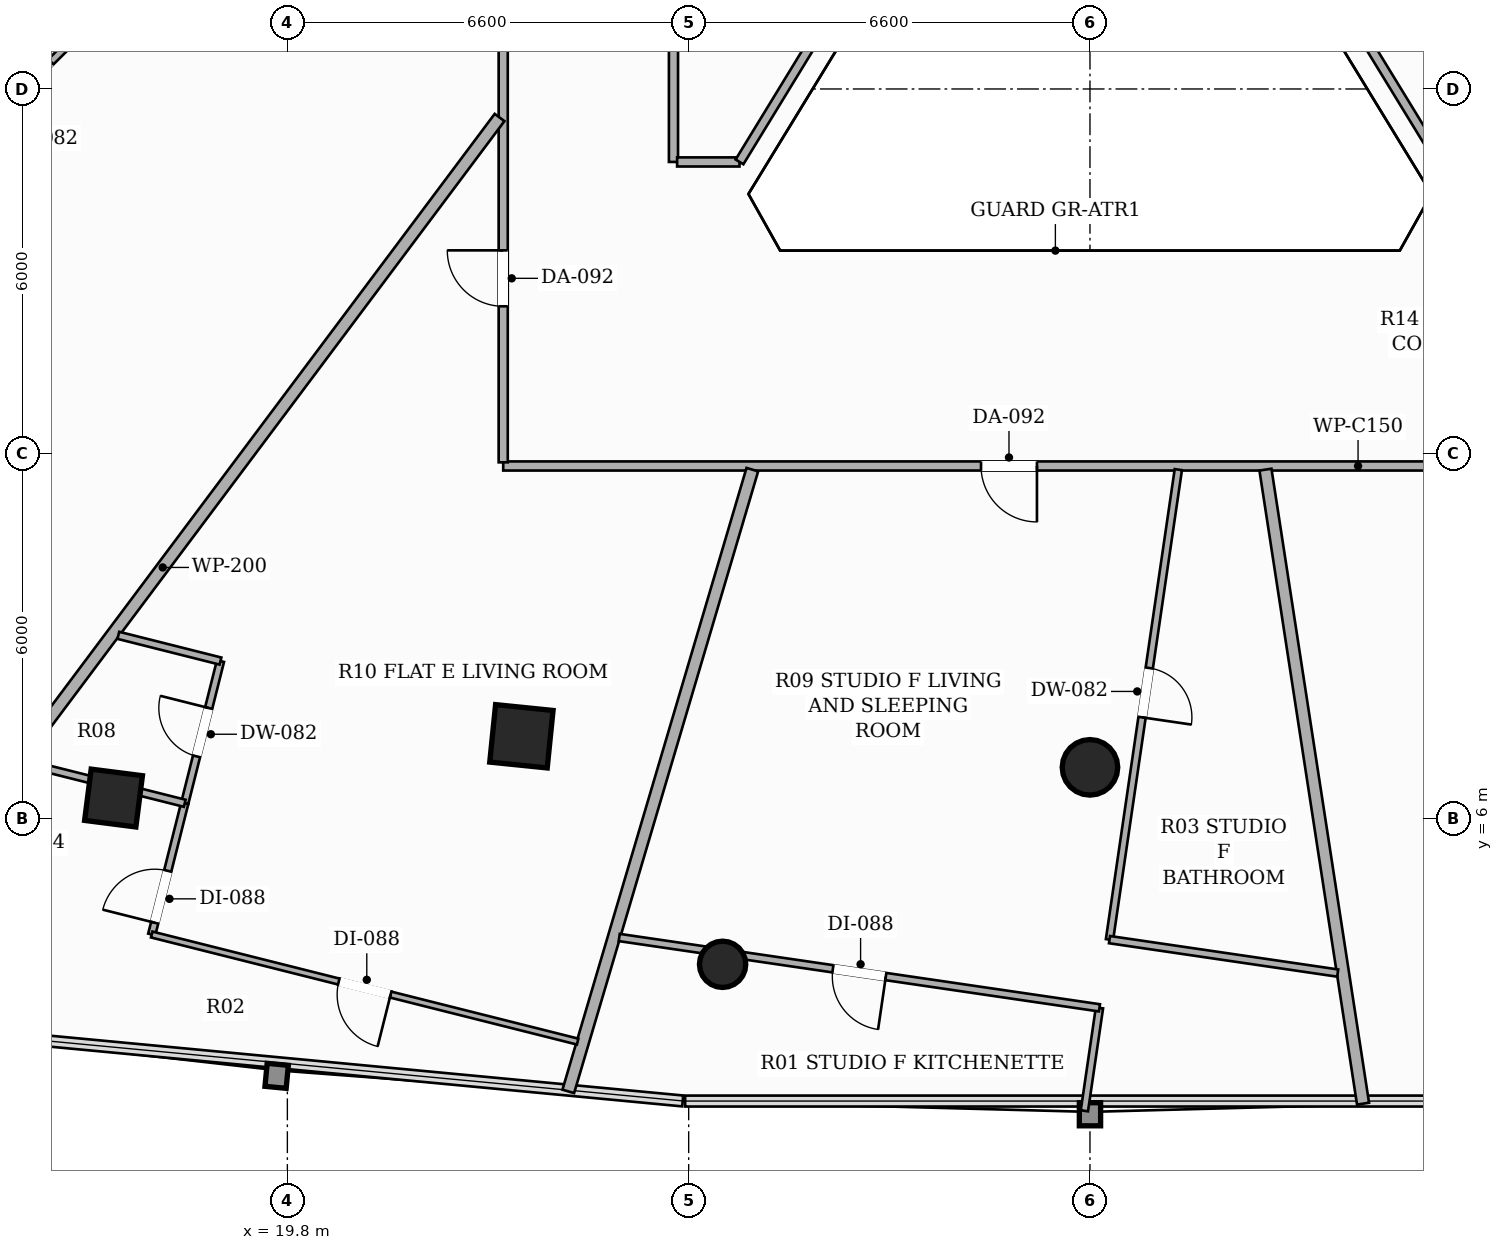
"""IFC4 building model, lengths in metres.
Left out: names, types, materials, properties, quantities, classifications, styles, units other than length and angle.
Written with IfcOpenShell. Run it as: python <this file> out.ifc"""

import sys

from ifc_helpers import new_model, si_unit, direction, frame, frame_2d, origin, origin_2d, place, context, subcontext, project, spatial, rectangle, hollow_rectangle, hollow_circle, extrude, element, fill, save


model = new_model("IFC4")
c1 = context("Model", 3, precision=1e-05, world=origin(), true_north=direction((0.0, 1.0)))
c2 = subcontext(c1, "Body", "Model", "MODEL_VIEW")
j1 = project(units=[si_unit("LENGTHUNIT", "METRE"), si_unit("PLANEANGLEUNIT", "RADIAN")], contexts=[c1])
p1 = place(None, origin())
s1 = spatial("IfcSite", under=j1, at=p1, CompositionType="ELEMENT")
p2 = place(p1, origin())
s2 = spatial("IfcBuilding", under=s1, at=p2, CompositionType="ELEMENT")
p3 = place(p2, frame((0.0, 0.0, 36.8)))
s3 = spatial("IfcBuildingStorey", under=s2, at=p3, CompositionType="ELEMENT", Elevation=36.8)
p4 = place(p3, frame((23.649, 7.355, 0.0), z_axis=(0.0, 0.0, 1.0), x_axis=(-0.994880708829, 0.101056297183, 0.0)))
e1 = element("IfcColumn", 1, at=p4, inside=s3, PredefinedType="COLUMN", context=c2, shape_type="SweptSolid", body=[
    extrude(hollow_rectangle(XDim=0.95, YDim=0.95, WallThickness=0.032, at=origin_2d()), origin(), (0.0, 0.0, 1.0), 3.3),
])
p5 = place(p3, frame((33.0, 6.844, 0.0), z_axis=(0.0, 0.0, 1.0), x_axis=(1.0, 0.0, 0.0)))
e2 = element("IfcColumn", 2, at=p5, inside=s3, PredefinedType="COLUMN", context=c2, shape_type="SweptSolid", body=[
    extrude(hollow_circle(Radius=0.457, WallThickness=0.025, at=origin_2d()), origin(), (0.0, 0.0, 1.0), 3.3),
])
p6 = place(p3, frame((16.941, 6.339, 0.0), z_axis=(0.0, 0.0, 1.0), x_axis=(-0.99189444259, 0.127064608601, 0.0)))
e3 = element("IfcColumn", 3, at=p6, inside=s3, PredefinedType="COLUMN", context=c2, shape_type="SweptSolid", body=[
    extrude(hollow_rectangle(XDim=0.85, YDim=0.85, WallThickness=0.028, at=origin_2d()), origin(), (0.0, 0.0, 1.0), 3.3),
])
p7 = place(p3, frame((26.958, 3.605, 0.0), z_axis=(0.0, 0.0, 1.0), x_axis=(1.0, 0.0, 0.0)))
e4 = element("IfcColumn", 4, at=p7, inside=s3, PredefinedType="COLUMN", context=c2, shape_type="SweptSolid", body=[
    extrude(hollow_circle(Radius=0.381, WallThickness=0.022, at=origin_2d()), origin(), (0.0, 0.0, 1.0), 3.3),
])
p8 = place(p3, frame((42.59, 11.8, 0.0), z_axis=(0.0, 0.0, 1.0), x_axis=(-1.0, 0.0, 0.0)))
e5 = element("IfcWall", 5, at=p8, inside=s3, PredefinedType="PARTITIONING", context=c2, shape_type="SweptSolid", body=[
    extrude(rectangle(XDim=19.24, YDim=0.15, at=frame_2d((9.62, 0.0))), origin(), (0.0, 0.0, 1.0), 2.669),
])
p9 = place(p8, frame((10.462, 0.0, 0.0)))
e6 = element("IfcOpeningElement", 6, at=p9, cuts=e5, PredefinedType="OPENING", context=c2, shape_type="SweptSolid", body=[
    extrude(rectangle(XDim=0.92, YDim=2.15, at=frame_2d((0.46, 1.075))), frame((0.0, 0.085, 0.0), z_axis=(0.0, -1.0, 0.0), x_axis=(1.0, 0.0, 0.0)), (0.0, 0.0, 1.0), 0.17),
])
p10 = place(p3, frame((23.35, 11.86, 0.0), z_axis=(0.0, 0.0, 1.0), x_axis=(0.0, 1.0, 0.0)))
e7 = element("IfcWall", 7, at=p10, inside=s3, PredefinedType="PARTITIONING", context=c2, shape_type="SweptSolid", body=[
    extrude(rectangle(XDim=25.04, YDim=0.15, at=frame_2d((12.52, 0.0))), origin(), (0.0, 0.0, 1.0), 2.413),
])
p11 = place(p10, frame((9.29, 0.0, 0.0)))
e8 = element("IfcOpeningElement", 8, at=p11, cuts=e7, PredefinedType="OPENING", context=c2, shape_type="SweptSolid", body=[
    extrude(rectangle(XDim=0.92, YDim=2.15, at=frame_2d((0.46, 1.075))), frame((0.0, 0.085, 0.0), z_axis=(0.0, -1.0, 0.0), x_axis=(1.0, 0.0, 0.0)), (0.0, 0.0, 1.0), 0.17),
])
p12 = place(p10, frame((18.865, 0.0, 0.0)))
e9 = element("IfcOpeningElement", 9, at=p12, cuts=e7, PredefinedType="OPENING", context=c2, shape_type="SweptSolid", body=[
    extrude(rectangle(XDim=0.88, YDim=2.1, at=frame_2d((0.44, 1.05))), frame((0.0, 0.085, 0.0), z_axis=(0.0, -1.0, 0.0), x_axis=(1.0, 0.0, 0.0)), (0.0, 0.0, 1.0), 0.17),
])
p13 = place(p10, frame((2.566, 0.0, 0.0)))
e10 = element("IfcOpeningElement", 10, at=p13, cuts=e7, PredefinedType="OPENING", context=c2, shape_type="SweptSolid", body=[
    extrude(rectangle(XDim=0.92, YDim=2.15, at=frame_2d((0.46, 1.075))), frame((0.0, 0.085, 0.0), z_axis=(0.0, -1.0, 0.0), x_axis=(1.0, 0.0, 0.0)), (0.0, 0.0, 1.0), 0.17),
])
p14 = place(p3, frame((26.15, 23.79, 0.0), z_axis=(0.0, 0.0, 1.0), x_axis=(0.0, -1.0, 0.0)))
e11 = element("IfcWall", 11, at=p14, inside=s3, PredefinedType="PARTITIONING", context=c2, shape_type="SweptSolid", body=[
    extrude(rectangle(XDim=6.99, YDim=0.15, at=frame_2d((3.495, 0.0))), origin(), (0.0, 0.0, 1.0), 2.669),
])
p15 = place(p14, frame((3.055, 0.0, 0.0)))
e12 = element("IfcOpeningElement", 12, at=p15, cuts=e11, PredefinedType="OPENING", context=c2, shape_type="SweptSolid", body=[
    extrude(rectangle(XDim=0.88, YDim=2.1, at=frame_2d((0.44, 1.05))), frame((0.0, 0.085, 0.0), z_axis=(0.0, -1.0, 0.0), x_axis=(1.0, 0.0, 0.0)), (0.0, 0.0, 1.0), 0.17),
])
p16 = place(p3, frame((26.21, 16.8, 0.0), z_axis=(0.0, 0.0, 1.0), x_axis=(1.0, 0.0, 0.0)))
e13 = element("IfcWall", 13, at=p16, inside=s3, PredefinedType="PARTITIONING", context=c2, shape_type="SweptSolid", body=[
    extrude(rectangle(XDim=1.026, YDim=0.15, at=frame_2d((0.513, 0.0))), origin(), (0.0, 0.0, 1.0), 3.06),
])
p17 = place(p3, frame((27.236, 16.801, 0.0), z_axis=(0.0, 0.0, 1.0), x_axis=(0.521617567684, 0.853179414358, 0.0)))
e14 = element("IfcWall", 14, at=p17, inside=s3, PredefinedType="PARTITIONING", context=c2, shape_type="SweptSolid", body=[
    extrude(rectangle(XDim=8.192, YDim=0.15, at=frame_2d((4.096, 0.0))), origin(), (0.0, 0.0, 1.0), 2.669),
])
p18 = place(p3, frame((34.486, 23.79, 0.0), z_axis=(0.0, 0.0, 1.0), x_axis=(0.521998190399, -0.852946592244, 0.0)))
e15 = element("IfcWall", 15, at=p18, inside=s3, PredefinedType="PARTITIONING", context=c2, shape_type="SweptSolid", body=[
    extrude(rectangle(XDim=8.195, YDim=0.15, at=frame_2d((4.098, 0.0))), origin(), (0.0, 0.0, 1.0), 2.669),
])
p19 = place(p3, frame((23.29, 17.531, 0.0), z_axis=(0.0, 0.0, 1.0), x_axis=(-0.599334217596, -0.800498904196, 0.0)))
e16 = element("IfcWall", 16, at=p19, inside=s3, PredefinedType="PARTITIONING", context=c2, shape_type="SweptSolid", body=[
    extrude(rectangle(XDim=18.487, YDim=0.2, at=frame_2d((9.244, 0.0))), origin(), (0.0, 0.0, 1.0), 2.413),
])
p20 = place(p3, frame((37.491, 1.313, 0.0), z_axis=(0.0, 0.0, 1.0), x_axis=(-0.152133698634, 0.988359923176, 0.0)))
e17 = element("IfcWall", 17, at=p20, inside=s3, PredefinedType="PARTITIONING", context=c2, shape_type="SweptSolid", body=[
    extrude(rectangle(XDim=10.55, YDim=0.2, at=frame_2d((5.275, 0.0))), origin(), (0.0, 0.0, 1.0), 2.413),
])
p21 = place(p3, frame((27.447, 11.74, 0.0), z_axis=(0.0, 0.0, 1.0), x_axis=(-0.283867721737, -0.958863450422, 0.0)))
e18 = element("IfcWall", 18, at=p21, inside=s3, PredefinedType="PARTITIONING", context=c2, shape_type="SweptSolid", body=[
    extrude(rectangle(XDim=10.664, YDim=0.2, at=frame_2d((5.332, 0.0))), origin(), (0.0, 0.0, 1.0), 2.413),
])
p22 = place(p3, frame((14.497, 17.043, 0.0), z_axis=(0.0, 0.0, 1.0), x_axis=(0.709608291954, 0.704596389425, 0.0)))
e19 = element("IfcWall", 19, at=p22, inside=s3, PredefinedType="PARTITIONING", context=c2, shape_type="SweptSolid", body=[
    extrude(rectangle(XDim=3.166, YDim=0.12, at=frame_2d((1.583, 0.0))), origin(), (0.0, 0.0, 1.0), 2.413),
])
p23 = place(p22, frame((1.173, 0.0, 0.0)))
e20 = element("IfcOpeningElement", 20, at=p23, cuts=e19, PredefinedType="OPENING", context=c2, shape_type="SweptSolid", body=[
    extrude(rectangle(XDim=0.82, YDim=2.1, at=frame_2d((0.41, 1.05))), frame((0.0, 0.07, 0.0), z_axis=(0.0, -1.0, 0.0), x_axis=(1.0, 0.0, 0.0)), (0.0, 0.0, 1.0), 0.14),
])
p24 = place(p3, frame((18.112, 6.253, 0.0), z_axis=(0.0, 0.0, 1.0), x_axis=(0.2437501366, 0.96983806427, 0.0)))
e21 = element("IfcWall", 21, at=p24, inside=s3, PredefinedType="PARTITIONING", context=c2, shape_type="SweptSolid", body=[
    extrude(rectangle(XDim=2.412, YDim=0.12, at=frame_2d((1.206, 0.0))), origin(), (0.0, 0.0, 1.0), 2.413),
])
p25 = place(p24, frame((0.796, 0.0, 0.0)))
e22 = element("IfcOpeningElement", 22, at=p25, cuts=e21, PredefinedType="OPENING", context=c2, shape_type="SweptSolid", body=[
    extrude(rectangle(XDim=0.82, YDim=2.1, at=frame_2d((0.41, 1.05))), frame((0.0, 0.07, 0.0), z_axis=(0.0, -1.0, 0.0), x_axis=(1.0, 0.0, 0.0)), (0.0, 0.0, 1.0), 0.14),
])
p26 = place(p3, frame((18.7, 8.592, 0.0), z_axis=(0.0, 0.0, 1.0), x_axis=(-0.969751613308, 0.244093851802, 0.0)))
e23 = element("IfcWall", 23, at=p26, inside=s3, PredefinedType="PARTITIONING", context=c2, shape_type="SweptSolid", body=[
    extrude(rectangle(XDim=1.732, YDim=0.12, at=frame_2d((0.866, 0.0))), origin(), (0.0, 0.0, 1.0), 2.669),
])
p27 = place(p3, frame((17.569, 4.095, 0.0), z_axis=(0.0, 0.0, 1.0), x_axis=(0.244006821807, 0.969773515266, 0.0)))
e24 = element("IfcWall", 24, at=p27, inside=s3, PredefinedType="PARTITIONING", context=c2, shape_type="SweptSolid", body=[
    extrude(rectangle(XDim=2.225, YDim=0.12, at=frame_2d((1.113, 0.0))), origin(), (0.0, 0.0, 1.0), 2.413),
])
p28 = place(p27, frame((0.2, 0.0, 0.0)))
e25 = element("IfcOpeningElement", 25, at=p28, cuts=e24, PredefinedType="OPENING", context=c2, shape_type="SweptSolid", body=[
    extrude(rectangle(XDim=0.88, YDim=2.1, at=frame_2d((0.44, 1.05))), frame((0.0, 0.07, 0.0), z_axis=(0.0, -1.0, 0.0), x_axis=(1.0, 0.0, 0.0)), (0.0, 0.0, 1.0), 0.14),
])
p29 = place(p3, frame((24.574, 2.334, 0.0), z_axis=(0.0, 0.0, 1.0), x_axis=(-0.9698235368, 0.243807931512, 0.0)))
e26 = element("IfcWall", 26, at=p29, inside=s3, PredefinedType="PARTITIONING", context=c2, shape_type="SweptSolid", body=[
    extrude(rectangle(XDim=7.223, YDim=0.1, at=frame_2d((3.611, 0.0))), origin(), (0.0, 0.0, 1.0), 3.06),
])
p30 = place(p29, frame((3.171, 0.0, 0.0)))
e27 = element("IfcOpeningElement", 27, at=p30, cuts=e26, PredefinedType="OPENING", context=c2, shape_type="SweptSolid", body=[
    extrude(rectangle(XDim=0.88, YDim=2.1, at=frame_2d((0.44, 1.05))), frame((0.0, 0.06, 0.0), z_axis=(0.0, -1.0, 0.0), x_axis=(1.0, 0.0, 0.0)), (0.0, 0.0, 1.0), 0.12),
])
p31 = place(p3, frame((18.112, 6.253, 0.0), z_axis=(0.0, 0.0, 1.0), x_axis=(-0.969869517874, 0.243624954178, 0.0)))
e28 = element("IfcWall", 28, at=p31, inside=s3, PredefinedType="PARTITIONING", context=c2, shape_type="SweptSolid", body=[
    extrude(rectangle(XDim=2.742, YDim=0.12, at=frame_2d((1.371, 0.0))), origin(), (0.0, 0.0, 1.0), 2.413),
])
p32 = place(p3, frame((34.453, 11.74, 0.0), z_axis=(0.0, 0.0, 1.0), x_axis=(-0.14489470787, -0.989447079753, 0.0)))
e29 = element("IfcWall", 29, at=p32, inside=s3, PredefinedType="PARTITIONING", context=c2, shape_type="SweptSolid", body=[
    extrude(rectangle(XDim=7.812, YDim=0.12, at=frame_2d((3.906, 0.0))), origin(), (0.0, 0.0, 1.0), 2.413),
])
p33 = place(p32, frame((3.297, 0.0, 0.0)))
e30 = element("IfcOpeningElement", 30, at=p33, cuts=e29, PredefinedType="OPENING", context=c2, shape_type="SweptSolid", body=[
    extrude(rectangle(XDim=0.82, YDim=2.1, at=frame_2d((0.41, 1.05))), frame((0.0, 0.07, 0.0), z_axis=(0.0, -1.0, 0.0), x_axis=(1.0, 0.0, 0.0)), (0.0, 0.0, 1.0), 0.14),
])
p34 = place(p3, frame((33.321, 4.011, 0.0), z_axis=(0.0, 0.0, 1.0), x_axis=(0.98942932615, -0.145015890698, 0.0)))
e31 = element("IfcWall", 31, at=p34, inside=s3, PredefinedType="PARTITIONING", context=c2, shape_type="SweptSolid", body=[
    extrude(rectangle(XDim=3.793, YDim=0.12, at=frame_2d((1.896, 0.0))), origin(), (0.0, 0.0, 1.0), 3.06),
])
p35 = place(p3, frame((32.908, 1.196, 0.0), z_axis=(0.0, 0.0, 1.0), x_axis=(0.144976360118, 0.98943511915, 0.0)))
e32 = element("IfcWall", 32, at=p35, inside=s3, PredefinedType="PARTITIONING", context=c2, shape_type="SweptSolid", body=[
    extrude(rectangle(XDim=1.711, YDim=0.12, at=frame_2d((0.855, 0.0))), origin(), (0.0, 0.0, 1.0), 3.06),
])
p36 = place(p3, frame((33.156, 2.889, 0.0), z_axis=(0.0, 0.0, 1.0), x_axis=(-0.98943978436, 0.144944517406, 0.0)))
e33 = element("IfcWall", 33, at=p36, inside=s3, PredefinedType="PARTITIONING", context=c2, shape_type="SweptSolid", body=[
    extrude(rectangle(XDim=7.982, YDim=0.12, at=frame_2d((3.991, 0.0))), origin(), (0.0, 0.0, 1.0), 2.413),
])
p37 = place(p36, frame((3.551, 0.0, 0.0)))
e34 = element("IfcOpeningElement", 34, at=p37, cuts=e33, PredefinedType="OPENING", context=c2, shape_type="SweptSolid", body=[
    extrude(rectangle(XDim=0.88, YDim=2.1, at=frame_2d((0.44, 1.05))), frame((0.0, 0.07, 0.0), z_axis=(0.0, -1.0, 0.0), x_axis=(1.0, 0.0, 0.0)), (0.0, 0.0, 1.0), 0.14),
])
p38 = place(p13, origin())
e35 = element("IfcDoor", 35, at=p38, inside=s3, OperationType="SINGLE_SWING_RIGHT", PredefinedType="DOOR", context=c2, shape_type="SweptSolid", body=[
    extrude(rectangle(XDim=0.92, YDim=2.15, at=frame_2d((0.46, 1.075))), frame((0.0, 0.025, 0.0), z_axis=(0.0, -1.0, 0.0), x_axis=(1.0, 0.0, 0.0)), (0.0, 0.0, 1.0), 0.05),
])
fill(e10, e35)
p39 = place(p25, origin())
e36 = element("IfcDoor", 36, at=p39, inside=s3, OperationType="SINGLE_SWING_RIGHT", PredefinedType="DOOR", context=c2, shape_type="SweptSolid", body=[
    extrude(rectangle(XDim=0.82, YDim=2.1, at=frame_2d((0.41, 1.05))), frame((0.0, 0.025, 0.0), z_axis=(0.0, -1.0, 0.0), x_axis=(1.0, 0.0, 0.0)), (0.0, 0.0, 1.0), 0.05),
])
fill(e22, e36)
p40 = place(p28, origin())
e37 = element("IfcDoor", 37, at=p40, inside=s3, OperationType="SINGLE_SWING_LEFT", PredefinedType="DOOR", context=c2, shape_type="SweptSolid", body=[
    extrude(rectangle(XDim=0.88, YDim=2.1, at=frame_2d((0.44, 1.05))), frame((0.0, 0.025, 0.0), z_axis=(0.0, -1.0, 0.0), x_axis=(1.0, 0.0, 0.0)), (0.0, 0.0, 1.0), 0.05),
])
fill(e25, e37)
p41 = place(p30, origin())
e38 = element("IfcDoor", 38, at=p41, inside=s3, OperationType="SINGLE_SWING_LEFT", PredefinedType="DOOR", context=c2, shape_type="SweptSolid", body=[
    extrude(rectangle(XDim=0.88, YDim=2.1, at=frame_2d((0.44, 1.05))), frame((0.0, 0.025, 0.0), z_axis=(0.0, -1.0, 0.0), x_axis=(1.0, 0.0, 0.0)), (0.0, 0.0, 1.0), 0.05),
])
fill(e27, e38)
p42 = place(p9, origin())
e39 = element("IfcDoor", 39, at=p42, inside=s3, OperationType="SINGLE_SWING_LEFT", PredefinedType="DOOR", context=c2, shape_type="SweptSolid", body=[
    extrude(rectangle(XDim=0.92, YDim=2.15, at=frame_2d((0.46, 1.075))), frame((0.0, 0.025, 0.0), z_axis=(0.0, -1.0, 0.0), x_axis=(1.0, 0.0, 0.0)), (0.0, 0.0, 1.0), 0.05),
])
fill(e6, e39)
p43 = place(p33, origin())
e40 = element("IfcDoor", 40, at=p43, inside=s3, OperationType="SINGLE_SWING_RIGHT", PredefinedType="DOOR", context=c2, shape_type="SweptSolid", body=[
    extrude(rectangle(XDim=0.82, YDim=2.1, at=frame_2d((0.41, 1.05))), frame((0.0, 0.025, 0.0), z_axis=(0.0, -1.0, 0.0), x_axis=(1.0, 0.0, 0.0)), (0.0, 0.0, 1.0), 0.05),
])
fill(e30, e40)
p44 = place(p37, origin())
e41 = element("IfcDoor", 41, at=p44, inside=s3, OperationType="SINGLE_SWING_LEFT", PredefinedType="DOOR", context=c2, shape_type="SweptSolid", body=[
    extrude(rectangle(XDim=0.88, YDim=2.1, at=frame_2d((0.44, 1.05))), frame((0.0, 0.025, 0.0), z_axis=(0.0, -1.0, 0.0), x_axis=(1.0, 0.0, 0.0)), (0.0, 0.0, 1.0), 0.05),
])
fill(e34, e41)
save(model, sys.argv[1])
